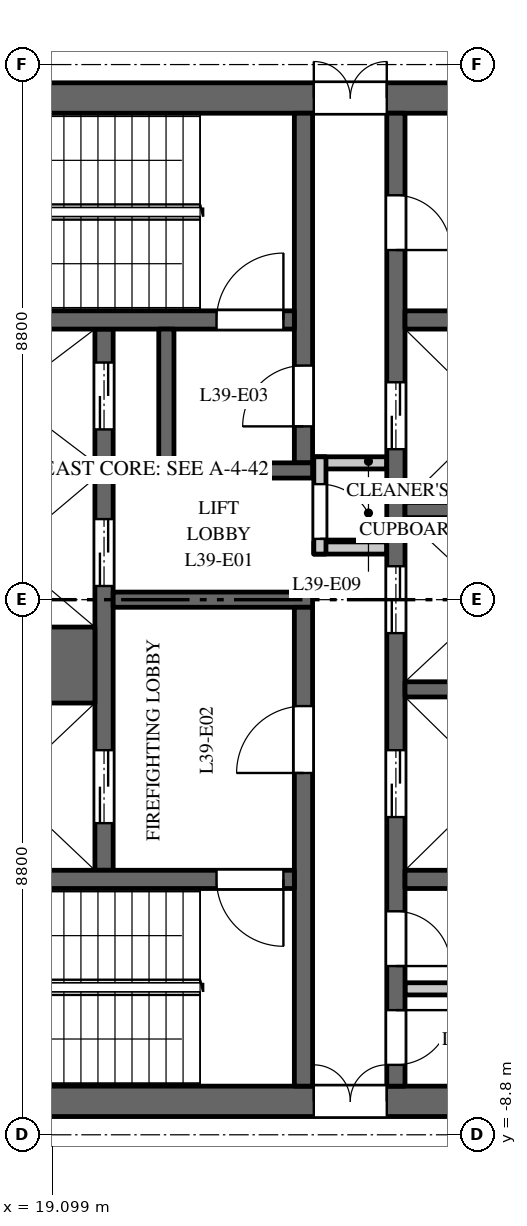
"""IFC4 building model, lengths in metres.
Left out: names, types, materials, properties, quantities, classifications, styles, units other than length and angle.
Written with IfcOpenShell. Run it as: python <this file> out.ifc"""

import sys

from ifc_helpers import new_model, si_unit, direction, frame, frame_2d, origin, place, context, subcontext, project, spatial, rectangle, extrude, element, fill, save


model = new_model("IFC4")
c1 = context("Model", 3, precision=1e-05, world=origin(), true_north=direction((0.0, 1.0)))
c2 = subcontext(c1, "Body", "Model", "MODEL_VIEW")
j1 = project(units=[si_unit("LENGTHUNIT", "METRE"), si_unit("PLANEANGLEUNIT", "RADIAN")], contexts=[c1])
p1 = place(None, origin())
s1 = spatial("IfcSite", under=j1, at=p1, CompositionType="ELEMENT")
p2 = place(p1, origin())
s2 = spatial("IfcBuilding", under=s1, at=p2, CompositionType="ELEMENT")
p3 = place(p2, frame((0.0, 0.0, 170.0)))
s3 = spatial("IfcBuildingStorey", under=s2, at=p3, CompositionType="ELEMENT", Elevation=170.0)
p4 = place(p3, frame((16.5, 8.25, 0.0), z_axis=(0.0, 0.0, 1.0), x_axis=(1.0, 0.0, 0.0)))
e1 = element("IfcWall", 1, at=p4, inside=s3, PredefinedType="SHEAR", context=c2, shape_type="SweptSolid", body=[
    extrude(rectangle(XDim=15.0, YDim=0.5, at=frame_2d((7.5, 0.0))), origin(), (0.0, 0.0, 1.0), 3.7),
])
p5 = place(p4, frame((6.9, 0.0, 0.0)))
e2 = element("IfcOpeningElement", 2, at=p5, cuts=e1, PredefinedType="OPENING", context=c2, shape_type="SweptSolid", body=[
    extrude(rectangle(XDim=1.2, YDim=2.1, at=frame_2d((0.6, 1.05))), frame((0.0, 0.26, 0.0), z_axis=(0.0, -1.0, 0.0), x_axis=(1.0, 0.0, 0.0)), (0.0, 0.0, 1.0), 0.52),
])
p6 = place(p4, frame((12.95, 0.0, 0.0)))
e3 = element("IfcOpeningElement", 3, at=p6, cuts=e1, PredefinedType="OPENING", context=c2, shape_type="SweptSolid", body=[
    extrude(rectangle(XDim=0.9, YDim=2.1, at=frame_2d((0.45, 1.05))), frame((0.0, 0.26, 0.0), z_axis=(0.0, -1.0, 0.0), x_axis=(1.0, 0.0, 0.0)), (0.0, 0.0, 1.0), 0.52),
])
p7 = place(p3, frame((16.5, -8.25, 0.0), z_axis=(0.0, 0.0, 1.0), x_axis=(1.0, 0.0, 0.0)))
e4 = element("IfcWall", 4, at=p7, inside=s3, PredefinedType="SHEAR", context=c2, shape_type="SweptSolid", body=[
    extrude(rectangle(XDim=15.0, YDim=0.5, at=frame_2d((7.5, 0.0))), origin(), (0.0, 0.0, 1.0), 3.7),
])
p8 = place(p7, frame((6.9, 0.0, 0.0)))
e5 = element("IfcOpeningElement", 5, at=p8, cuts=e4, PredefinedType="OPENING", context=c2, shape_type="SweptSolid", body=[
    extrude(rectangle(XDim=1.2, YDim=2.1, at=frame_2d((0.6, 1.05))), frame((0.0, 0.26, 0.0), z_axis=(0.0, -1.0, 0.0), x_axis=(1.0, 0.0, 0.0)), (0.0, 0.0, 1.0), 0.52),
])
p9 = place(p7, frame((12.275, 0.0, 0.0)))
e6 = element("IfcOpeningElement", 6, at=p9, cuts=e4, PredefinedType="OPENING", context=c2, shape_type="SweptSolid", body=[
    extrude(rectangle(XDim=0.9, YDim=2.1, at=frame_2d((0.45, 1.05))), frame((0.0, 0.26, 0.0), z_axis=(0.0, -1.0, 0.0), x_axis=(1.0, 0.0, 0.0)), (0.0, 0.0, 1.0), 0.52),
])
p10 = place(p3, frame((19.95, -4.45, 0.0), z_axis=(0.0, 0.0, 1.0), x_axis=(0.0, 1.0, 0.0)))
e7 = element("IfcWall", 7, at=p10, inside=s3, PredefinedType="SHEAR", context=c2, shape_type="SweptSolid", body=[
    extrude(rectangle(XDim=8.9, YDim=0.3, at=frame_2d((4.45, 0.0))), origin(), (0.0, 0.0, 1.0), 3.7),
])
p11 = place(p10, frame((0.775, 0.0, 0.0)))
e8 = element("IfcOpeningElement", 8, at=p11, cuts=e7, PredefinedType="OPENING", context=c2, shape_type="SweptSolid", body=[
    extrude(rectangle(XDim=1.2, YDim=2.1, at=frame_2d((0.6, 1.05))), frame((0.0, 0.16, 0.0), z_axis=(0.0, -1.0, 0.0), x_axis=(1.0, 0.0, 0.0)), (0.0, 0.0, 1.0), 0.32),
])
p12 = place(p10, frame((4.675, 0.0, 0.0)))
e9 = element("IfcOpeningElement", 9, at=p12, cuts=e7, PredefinedType="OPENING", context=c2, shape_type="SweptSolid", body=[
    extrude(rectangle(XDim=1.1, YDim=2.1, at=frame_2d((0.55, 1.05))), frame((0.0, 0.16, 0.0), z_axis=(0.0, -1.0, 0.0), x_axis=(1.0, 0.0, 0.0)), (0.0, 0.0, 1.0), 0.32),
])
p13 = place(p10, frame((7.25, 0.0, 0.0)))
e10 = element("IfcOpeningElement", 10, at=p13, cuts=e7, PredefinedType="OPENING", context=c2, shape_type="SweptSolid", body=[
    extrude(rectangle(XDim=1.1, YDim=2.1, at=frame_2d((0.55, 1.05))), frame((0.0, 0.16, 0.0), z_axis=(0.0, -1.0, 0.0), x_axis=(1.0, 0.0, 0.0)), (0.0, 0.0, 1.0), 0.32),
])
p14 = place(p3, frame((24.75, -8.0, 0.0), z_axis=(0.0, 0.0, 1.0), x_axis=(0.0, 1.0, 0.0)))
e11 = element("IfcWall", 11, at=p14, inside=s3, PredefinedType="SHEAR", context=c2, shape_type="SweptSolid", body=[
    extrude(rectangle(XDim=16.0, YDim=0.3, at=frame_2d((8.0, 0.0))), origin(), (0.0, 0.0, 1.0), 3.7),
])
p15 = place(p14, frame((4.425, 0.0, 0.0)))
e12 = element("IfcOpeningElement", 12, at=p15, cuts=e11, PredefinedType="OPENING", context=c2, shape_type="SweptSolid", body=[
    extrude(rectangle(XDim=1.1, YDim=2.1, at=frame_2d((0.55, 1.05))), frame((0.0, 0.16, 0.0), z_axis=(0.0, -1.0, 0.0), x_axis=(1.0, 0.0, 0.0)), (0.0, 0.0, 1.0), 0.32),
])
p16 = place(p14, frame((7.45, 0.0, 0.0)))
e13 = element("IfcOpeningElement", 13, at=p16, cuts=e11, PredefinedType="OPENING", context=c2, shape_type="SweptSolid", body=[
    extrude(rectangle(XDim=1.1, YDim=2.1, at=frame_2d((0.55, 1.05))), frame((0.0, 0.16, 0.0), z_axis=(0.0, -1.0, 0.0), x_axis=(1.0, 0.0, 0.0)), (0.0, 0.0, 1.0), 0.32),
])
p17 = place(p14, frame((10.475, 0.0, 0.0)))
e14 = element("IfcOpeningElement", 14, at=p17, cuts=e11, PredefinedType="OPENING", context=c2, shape_type="SweptSolid", body=[
    extrude(rectangle(XDim=1.1, YDim=2.1, at=frame_2d((0.55, 1.05))), frame((0.0, 0.16, 0.0), z_axis=(0.0, -1.0, 0.0), x_axis=(1.0, 0.0, 0.0)), (0.0, 0.0, 1.0), 0.32),
])
p18 = place(p14, frame((13.75, 0.0, 0.0)))
e15 = element("IfcOpeningElement", 15, at=p18, cuts=e11, PredefinedType="OPENING", context=c2, shape_type="SweptSolid", body=[
    extrude(rectangle(XDim=0.9, YDim=2.1, at=frame_2d((0.45, 1.05))), frame((0.0, 0.16, 0.0), z_axis=(0.0, -1.0, 0.0), x_axis=(1.0, 0.0, 0.0)), (0.0, 0.0, 1.0), 0.32),
])
p19 = place(p14, frame((1.975, 0.0, 0.0)))
e16 = element("IfcOpeningElement", 16, at=p19, cuts=e11, PredefinedType="OPENING", context=c2, shape_type="SweptSolid", body=[
    extrude(rectangle(XDim=0.9, YDim=2.1, at=frame_2d((0.45, 1.05))), frame((0.0, 0.16, 0.0), z_axis=(0.0, -1.0, 0.0), x_axis=(1.0, 0.0, 0.0)), (0.0, 0.0, 1.0), 0.32),
])
p20 = place(p14, frame((0.35, 0.0, 0.0)))
e17 = element("IfcOpeningElement", 17, at=p20, cuts=e11, PredefinedType="OPENING", context=c2, shape_type="SweptSolid", body=[
    extrude(rectangle(XDim=0.9, YDim=2.1, at=frame_2d((0.45, 1.05))), frame((0.0, 0.16, 0.0), z_axis=(0.0, -1.0, 0.0), x_axis=(1.0, 0.0, 0.0)), (0.0, 0.0, 1.0), 0.32),
])
p21 = place(p3, frame((20.1, 0.0, 0.0), z_axis=(0.0, 0.0, 1.0), x_axis=(1.0, 0.0, 0.0)))
e18 = element("IfcWall", 18, at=p21, inside=s3, PredefinedType="SHEAR", context=c2, shape_type="SweptSolid", body=[
    extrude(rectangle(XDim=3.28, YDim=0.25, at=frame_2d((1.64, 0.0))), origin(), (0.0, 0.0, 1.0), 3.7),
])
for number, where, z_axis, x_axis in (
    (19, (23.4, 0.85, 0.0), (0.0, 0.0, 1.0), (1.0, 0.0, 0.0)),
    (20, (23.4, 2.25, 0.0), (0.0, 0.0, 1.0), (1.0, 0.0, 0.0)),
):
    element("IfcWall", number, at=place(p3, frame(where, z_axis=z_axis, x_axis=x_axis)), inside=s3, PredefinedType="PARTITIONING", context=c2, shape_type="SweptSolid", body=[
        extrude(rectangle(XDim=1.2, YDim=0.2, at=frame_2d((0.6, 0.0))), origin(), (0.0, 0.0, 1.0), 3.7),
    ])
p22 = place(p3, frame((23.5, 0.75, 0.0), z_axis=(0.0, 0.0, 1.0), x_axis=(0.0, 1.0, 0.0)))
e21 = element("IfcWall", 21, at=p22, inside=s3, PredefinedType="PARTITIONING", context=c2, shape_type="SweptSolid", body=[
    extrude(rectangle(XDim=1.6, YDim=0.2, at=frame_2d((0.8, 0.0))), origin(), (0.0, 0.0, 1.0), 3.7),
])
p23 = place(p22, frame((0.25, 0.0, 0.0)))
e22 = element("IfcOpeningElement", 22, at=p23, cuts=e21, PredefinedType="OPENING", context=c2, shape_type="SweptSolid", body=[
    extrude(rectangle(XDim=0.9, YDim=2.1, at=frame_2d((0.45, 1.05))), frame((0.0, 0.11, 0.0), z_axis=(0.0, -1.0, 0.0), x_axis=(1.0, 0.0, 0.0)), (0.0, 0.0, 1.0), 0.22),
])
p24 = place(p3, frame((24.9, 4.6, 0.0), z_axis=(0.0, 0.0, 1.0), x_axis=(1.0, 0.0, 0.0)))
e23 = element("IfcWall", 23, at=p24, inside=s3, PredefinedType="SHEAR", context=c2, shape_type="SweptSolid", body=[
    extrude(rectangle(XDim=6.1, YDim=0.3, at=frame_2d((3.05, 0.0))), origin(), (0.0, 0.0, 1.0), 3.7),
])
p25 = place(p24, frame((4.2, 0.0, 0.0)))
e24 = element("IfcOpeningElement", 24, at=p25, cuts=e23, PredefinedType="OPENING", context=c2, shape_type="SweptSolid", body=[
    extrude(rectangle(XDim=0.9, YDim=2.1, at=frame_2d((0.45, 1.05))), frame((0.0, 0.16, 0.0), z_axis=(0.0, -1.0, 0.0), x_axis=(1.0, 0.0, 0.0)), (0.0, 0.0, 1.0), 0.32),
])
p26 = place(p3, frame((24.9, -6.4, 0.0), z_axis=(0.0, 0.0, 1.0), x_axis=(1.0, 0.0, 0.0)))
e25 = element("IfcWall", 25, at=p26, inside=s3, PredefinedType="PARTITIONING", context=c2, shape_type="SweptSolid", body=[
    extrude(rectangle(XDim=2.35, YDim=0.2, at=frame_2d((1.175, 0.0))), origin(), (0.0, 0.0, 1.0), 3.7),
])
p27 = place(p3, frame((24.9, -4.6, 0.0), z_axis=(0.0, 0.0, 1.0), x_axis=(1.0, 0.0, 0.0)))
e26 = element("IfcWall", 26, at=p27, inside=s3, PredefinedType="SHEAR", context=c2, shape_type="SweptSolid", body=[
    extrude(rectangle(XDim=6.1, YDim=0.3, at=frame_2d((3.05, 0.0))), origin(), (0.0, 0.0, 1.0), 3.7),
])
p28 = place(p3, frame((16.9, -1.075, 0.0), z_axis=(0.0, 0.0, 1.0), x_axis=(1.0, 0.0, 0.0)))
e27 = element("IfcWall", 27, at=p28, inside=s3, PredefinedType="SHEAR", context=c2, shape_type="SweptSolid", body=[
    extrude(rectangle(XDim=2.9, YDim=1.25, at=frame_2d((1.45, 0.0))), origin(), (0.0, 0.0, 1.0), 3.7),
])
for number, where, z_axis, x_axis in (
    (28, (16.9, 2.125, 0.0), (0.0, 0.0, 1.0), (1.0, 0.0, 0.0)),
    (29, (24.9, -1.475, 0.0), (0.0, 0.0, 1.0), (1.0, 0.0, 0.0)),
    (30, (24.9, 1.475, 0.0), (0.0, 0.0, 1.0), (1.0, 0.0, 0.0)),
):
    element("IfcWall", number, at=place(p3, frame(where, z_axis=z_axis, x_axis=x_axis)), inside=s3, PredefinedType="SHEAR", context=c2, shape_type="SweptSolid", body=[
        extrude(rectangle(XDim=2.9, YDim=0.25, at=frame_2d((1.45, 0.0))), origin(), (0.0, 0.0, 1.0), 3.7),
    ])
p29 = place(p3, frame((23.23, 2.25, 0.0), z_axis=(0.0, 0.0, 1.0), x_axis=(0.0, 1.0, 0.0)))
e31 = element("IfcWall", 31, at=p29, inside=s3, PredefinedType="SHEAR", context=c2, shape_type="SweptSolid", body=[
    extrude(rectangle(XDim=5.75, YDim=0.3, at=frame_2d((2.875, 0.0))), origin(), (0.0, 0.0, 1.0), 3.7),
])
p30 = place(p29, frame((0.6, 0.0, 0.0)))
e32 = element("IfcOpeningElement", 32, at=p30, cuts=e31, PredefinedType="OPENING", context=c2, shape_type="SweptSolid", body=[
    extrude(rectangle(XDim=1.0, YDim=2.1, at=frame_2d((0.5, 1.05))), frame((0.0, 0.16, 0.0), z_axis=(0.0, -1.0, 0.0), x_axis=(1.0, 0.0, 0.0)), (0.0, 0.0, 1.0), 0.32),
])
p31 = place(p3, frame((23.23, -8.0, 0.0), z_axis=(0.0, 0.0, 1.0), x_axis=(0.0, 1.0, 0.0)))
e33 = element("IfcWall", 33, at=p31, inside=s3, PredefinedType="SHEAR", context=c2, shape_type="SweptSolid", body=[
    extrude(rectangle(XDim=7.875, YDim=0.3, at=frame_2d((3.938, 0.0))), origin(), (0.0, 0.0, 1.0), 3.7),
])
p32 = place(p31, frame((5.15, 0.0, 0.0)))
e34 = element("IfcOpeningElement", 34, at=p32, cuts=e33, PredefinedType="OPENING", context=c2, shape_type="SweptSolid", body=[
    extrude(rectangle(XDim=1.1, YDim=2.1, at=frame_2d((0.55, 1.05))), frame((0.0, 0.16, 0.0), z_axis=(0.0, -1.0, 0.0), x_axis=(1.0, 0.0, 0.0)), (0.0, 0.0, 1.0), 0.32),
])
p33 = place(p3, frame((16.9, 4.6, 0.0), z_axis=(0.0, 0.0, 1.0), x_axis=(1.0, 0.0, 0.0)))
e35 = element("IfcWall", 35, at=p33, inside=s3, PredefinedType="SHEAR", context=c2, shape_type="SweptSolid", body=[
    extrude(rectangle(XDim=6.18, YDim=0.3, at=frame_2d((3.09, 0.0))), origin(), (0.0, 0.0, 1.0), 3.7),
])
p34 = place(p33, frame((4.9, 0.0, 0.0)))
e36 = element("IfcOpeningElement", 36, at=p34, cuts=e35, PredefinedType="OPENING", context=c2, shape_type="SweptSolid", body=[
    extrude(rectangle(XDim=1.1, YDim=2.1, at=frame_2d((0.55, 1.05))), frame((0.0, 0.16, 0.0), z_axis=(0.0, -1.0, 0.0), x_axis=(1.0, 0.0, 0.0)), (0.0, 0.0, 1.0), 0.32),
])
p35 = place(p3, frame((16.9, -4.6, 0.0), z_axis=(0.0, 0.0, 1.0), x_axis=(1.0, 0.0, 0.0)))
e37 = element("IfcWall", 37, at=p35, inside=s3, PredefinedType="SHEAR", context=c2, shape_type="SweptSolid", body=[
    extrude(rectangle(XDim=6.18, YDim=0.3, at=frame_2d((3.09, 0.0))), origin(), (0.0, 0.0, 1.0), 3.7),
])
p36 = place(p35, frame((4.9, 0.0, 0.0)))
e38 = element("IfcOpeningElement", 38, at=p36, cuts=e37, PredefinedType="OPENING", context=c2, shape_type="SweptSolid", body=[
    extrude(rectangle(XDim=1.1, YDim=2.1, at=frame_2d((0.55, 1.05))), frame((0.0, 0.16, 0.0), z_axis=(0.0, -1.0, 0.0), x_axis=(1.0, 0.0, 0.0)), (0.0, 0.0, 1.0), 0.32),
])
p37 = place(p3, frame((20.85, 2.125, 0.0), z_axis=(0.0, 0.0, 1.0), x_axis=(1.0, 0.0, 0.0)))
e39 = element("IfcWall", 39, at=p37, inside=s3, PredefinedType="SHEAR", context=c2, shape_type="SweptSolid", body=[
    extrude(rectangle(XDim=2.53, YDim=0.25, at=frame_2d((1.265, 0.0))), origin(), (0.0, 0.0, 1.0), 3.7),
])
p38 = place(p3, frame((20.975, 2.25, 0.0), z_axis=(0.0, 0.0, 1.0), x_axis=(0.0, 1.0, 0.0)))
e40 = element("IfcWall", 40, at=p38, inside=s3, PredefinedType="SHEAR", context=c2, shape_type="SweptSolid", body=[
    extrude(rectangle(XDim=2.2, YDim=0.25, at=frame_2d((1.1, 0.0))), origin(), (0.0, 0.0, 1.0), 3.7),
])
p39 = place(p11, origin())
e41 = element("IfcDoor", 41, at=p39, inside=s3, OperationType="DOUBLE_DOOR_SLIDING", PredefinedType="DOOR", context=c2, shape_type="SweptSolid", body=[
    extrude(rectangle(XDim=1.2, YDim=2.1, at=frame_2d((0.6, 1.05))), frame((0.0, 0.025, 0.0), z_axis=(0.0, -1.0, 0.0), x_axis=(1.0, 0.0, 0.0)), (0.0, 0.0, 1.0), 0.05),
])
fill(e8, e41)
p40 = place(p12, origin())
e42 = element("IfcDoor", 42, at=p40, inside=s3, OperationType="DOUBLE_DOOR_SLIDING", PredefinedType="DOOR", context=c2, shape_type="SweptSolid", body=[
    extrude(rectangle(XDim=1.1, YDim=2.1, at=frame_2d((0.55, 1.05))), frame((0.0, 0.025, 0.0), z_axis=(0.0, -1.0, 0.0), x_axis=(1.0, 0.0, 0.0)), (0.0, 0.0, 1.0), 0.05),
])
fill(e9, e42)
p41 = place(p13, origin())
e43 = element("IfcDoor", 43, at=p41, inside=s3, OperationType="DOUBLE_DOOR_SLIDING", PredefinedType="DOOR", context=c2, shape_type="SweptSolid", body=[
    extrude(rectangle(XDim=1.1, YDim=2.1, at=frame_2d((0.55, 1.05))), frame((0.0, 0.025, 0.0), z_axis=(0.0, -1.0, 0.0), x_axis=(1.0, 0.0, 0.0)), (0.0, 0.0, 1.0), 0.05),
])
fill(e10, e43)
p42 = place(p15, origin())
e44 = element("IfcDoor", 44, at=p42, inside=s3, OperationType="DOUBLE_DOOR_SLIDING", PredefinedType="DOOR", context=c2, shape_type="SweptSolid", body=[
    extrude(rectangle(XDim=1.1, YDim=2.1, at=frame_2d((0.55, 1.05))), frame((0.0, 0.025, 0.0), z_axis=(0.0, -1.0, 0.0), x_axis=(1.0, 0.0, 0.0)), (0.0, 0.0, 1.0), 0.05),
])
fill(e12, e44)
p43 = place(p16, origin())
e45 = element("IfcDoor", 45, at=p43, inside=s3, OperationType="DOUBLE_DOOR_SLIDING", PredefinedType="DOOR", context=c2, shape_type="SweptSolid", body=[
    extrude(rectangle(XDim=1.1, YDim=2.1, at=frame_2d((0.55, 1.05))), frame((0.0, 0.025, 0.0), z_axis=(0.0, -1.0, 0.0), x_axis=(1.0, 0.0, 0.0)), (0.0, 0.0, 1.0), 0.05),
])
fill(e13, e45)
p44 = place(p17, origin())
e46 = element("IfcDoor", 46, at=p44, inside=s3, OperationType="DOUBLE_DOOR_SLIDING", PredefinedType="DOOR", context=c2, shape_type="SweptSolid", body=[
    extrude(rectangle(XDim=1.1, YDim=2.1, at=frame_2d((0.55, 1.05))), frame((0.0, 0.025, 0.0), z_axis=(0.0, -1.0, 0.0), x_axis=(1.0, 0.0, 0.0)), (0.0, 0.0, 1.0), 0.05),
])
fill(e14, e46)
p45 = place(p34, origin())
e47 = element("IfcDoor", 47, at=p45, inside=s3, OperationType="SINGLE_SWING_LEFT", PredefinedType="DOOR", context=c2, shape_type="SweptSolid", body=[
    extrude(rectangle(XDim=1.1, YDim=2.1, at=frame_2d((0.55, 1.05))), frame((0.0, 0.025, 0.0), z_axis=(0.0, -1.0, 0.0), x_axis=(1.0, 0.0, 0.0)), (0.0, 0.0, 1.0), 0.05),
])
fill(e36, e47)
p46 = place(p36, origin())
e48 = element("IfcDoor", 48, at=p46, inside=s3, OperationType="SINGLE_SWING_RIGHT", PredefinedType="DOOR", context=c2, shape_type="SweptSolid", body=[
    extrude(rectangle(XDim=1.1, YDim=2.1, at=frame_2d((0.55, 1.05))), frame((0.0, 0.025, 0.0), z_axis=(0.0, -1.0, 0.0), x_axis=(1.0, 0.0, 0.0)), (0.0, 0.0, 1.0), 0.05),
])
fill(e38, e48)
p47 = place(p32, origin())
e49 = element("IfcDoor", 49, at=p47, inside=s3, OperationType="SINGLE_SWING_RIGHT", PredefinedType="DOOR", context=c2, shape_type="SweptSolid", body=[
    extrude(rectangle(XDim=1.1, YDim=2.1, at=frame_2d((0.55, 1.05))), frame((0.0, 0.025, 0.0), z_axis=(0.0, -1.0, 0.0), x_axis=(1.0, 0.0, 0.0)), (0.0, 0.0, 1.0), 0.05),
])
fill(e34, e49)
p48 = place(p30, origin())
e50 = element("IfcDoor", 50, at=p48, inside=s3, OperationType="SINGLE_SWING_RIGHT", PredefinedType="DOOR", context=c2, shape_type="SweptSolid", body=[
    extrude(rectangle(XDim=1.0, YDim=2.1, at=frame_2d((0.5, 1.05))), frame((0.0, 0.025, 0.0), z_axis=(0.0, -1.0, 0.0), x_axis=(1.0, 0.0, 0.0)), (0.0, 0.0, 1.0), 0.05),
])
fill(e32, e50)
p49 = place(p5, origin())
e51 = element("IfcDoor", 51, at=p49, inside=s3, OperationType="DOUBLE_DOOR_DOUBLE_SWING", PredefinedType="DOOR", context=c2, shape_type="SweptSolid", body=[
    extrude(rectangle(XDim=1.2, YDim=2.1, at=frame_2d((0.6, 1.05))), frame((0.0, 0.025, 0.0), z_axis=(0.0, -1.0, 0.0), x_axis=(1.0, 0.0, 0.0)), (0.0, 0.0, 1.0), 0.05),
])
fill(e2, e51)
p50 = place(p8, origin())
e52 = element("IfcDoor", 52, at=p50, inside=s3, OperationType="DOUBLE_DOOR_DOUBLE_SWING", PredefinedType="DOOR", context=c2, shape_type="SweptSolid", body=[
    extrude(rectangle(XDim=1.2, YDim=2.1, at=frame_2d((0.6, 1.05))), frame((0.0, 0.025, 0.0), z_axis=(0.0, -1.0, 0.0), x_axis=(1.0, 0.0, 0.0)), (0.0, 0.0, 1.0), 0.05),
])
fill(e5, e52)
p51 = place(p18, origin())
e53 = element("IfcDoor", 53, at=p51, inside=s3, OperationType="SINGLE_SWING_LEFT", PredefinedType="DOOR", context=c2, shape_type="SweptSolid", body=[
    extrude(rectangle(XDim=0.9, YDim=2.1, at=frame_2d((0.45, 1.05))), frame((0.0, 0.025, 0.0), z_axis=(0.0, -1.0, 0.0), x_axis=(1.0, 0.0, 0.0)), (0.0, 0.0, 1.0), 0.05),
])
fill(e15, e53)
p52 = place(p19, origin())
e54 = element("IfcDoor", 54, at=p52, inside=s3, OperationType="SINGLE_SWING_LEFT", PredefinedType="DOOR", context=c2, shape_type="SweptSolid", body=[
    extrude(rectangle(XDim=0.9, YDim=2.1, at=frame_2d((0.45, 1.05))), frame((0.0, 0.025, 0.0), z_axis=(0.0, -1.0, 0.0), x_axis=(1.0, 0.0, 0.0)), (0.0, 0.0, 1.0), 0.05),
])
fill(e16, e54)
p53 = place(p20, origin())
e55 = element("IfcDoor", 55, at=p53, inside=s3, OperationType="SINGLE_SWING_RIGHT", PredefinedType="DOOR", context=c2, shape_type="SweptSolid", body=[
    extrude(rectangle(XDim=0.9, YDim=2.1, at=frame_2d((0.45, 1.05))), frame((0.0, 0.025, 0.0), z_axis=(0.0, -1.0, 0.0), x_axis=(1.0, 0.0, 0.0)), (0.0, 0.0, 1.0), 0.05),
])
fill(e17, e55)
p54 = place(p23, origin())
e56 = element("IfcDoor", 56, at=p54, inside=s3, OperationType="SINGLE_SWING_LEFT", PredefinedType="DOOR", context=c2, shape_type="SweptSolid", body=[
    extrude(rectangle(XDim=0.9, YDim=2.1, at=frame_2d((0.45, 1.05))), frame((0.0, 0.025, 0.0), z_axis=(0.0, -1.0, 0.0), x_axis=(1.0, 0.0, 0.0)), (0.0, 0.0, 1.0), 0.05),
])
fill(e22, e56)
save(model, sys.argv[1])
